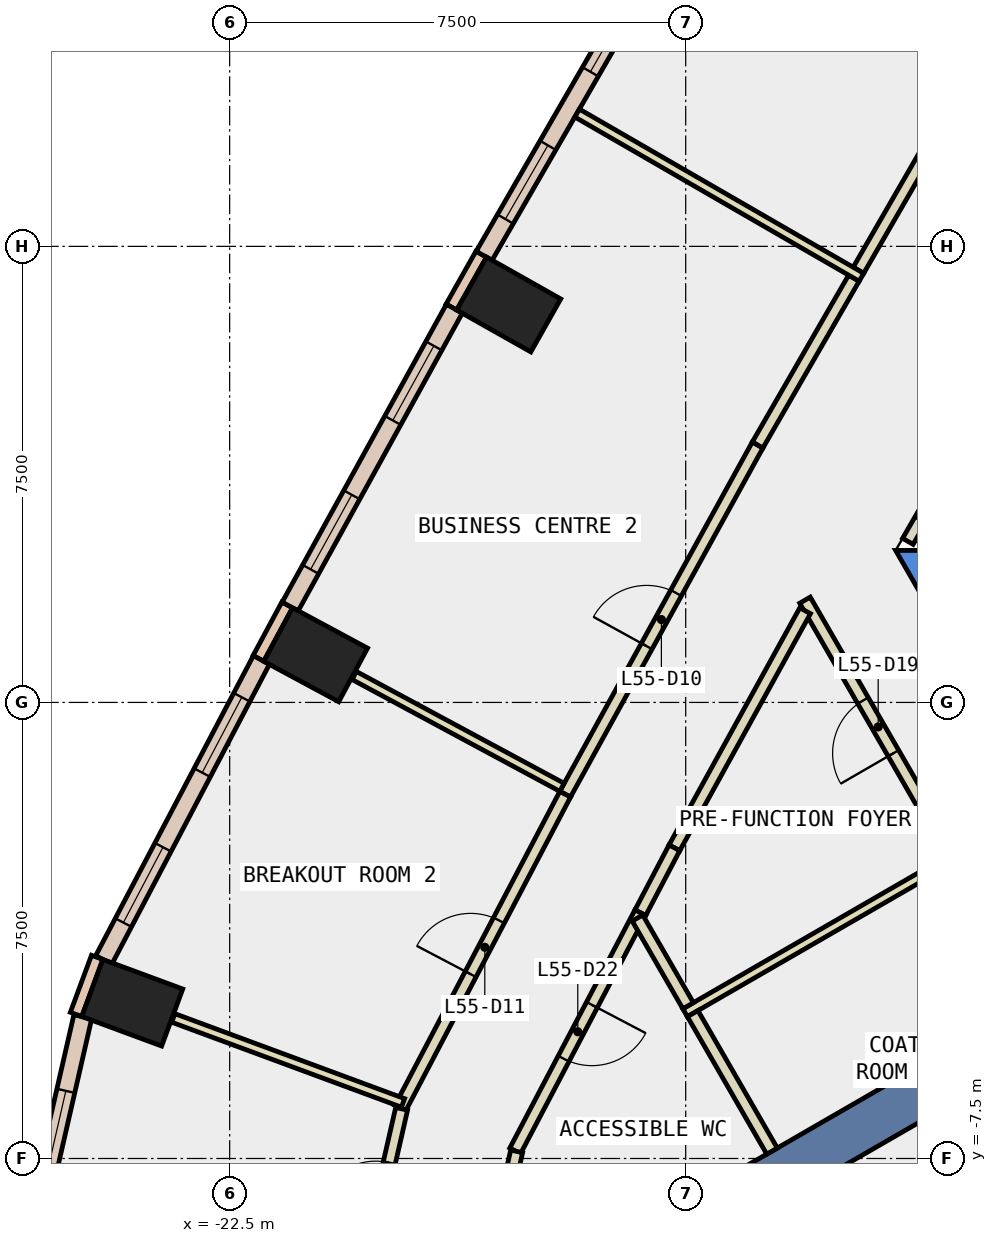
"""IFC4 building model, lengths in metres.
Left out: names, types, materials, properties, quantities, classifications, styles, units other than length and angle.
Written with IfcOpenShell. Run it as: python <this file> out.ifc"""

import sys

from ifc_helpers import new_model, si_unit, direction, frame, frame_2d, origin, origin_2d, place, context, subcontext, project, spatial, polyline, rectangle, outline, extrude, element, fill, save


model = new_model("IFC4")
c1 = context("Model", 3, precision=1e-05, world=origin(), true_north=direction((0.0, 1.0)))
c2 = subcontext(c1, "Body", "Model", "MODEL_VIEW")
j1 = project(units=[si_unit("LENGTHUNIT", "METRE"), si_unit("PLANEANGLEUNIT", "RADIAN")], contexts=[c1])
p1 = place(None, origin())
s1 = spatial("IfcSite", under=j1, at=p1, CompositionType="ELEMENT")
p2 = place(p1, origin())
s2 = spatial("IfcBuilding", under=s1, at=p2, CompositionType="ELEMENT")
p3 = place(p2, frame((0.0, 0.0, 245.0)))
s3 = spatial("IfcBuildingStorey", under=s2, at=p3, CompositionType="ELEMENT", Elevation=245.0)
for number, where, z_axis, x_axis in (
    (1, (-17.911, 6.544, -0.34), (0.0, 0.0, 1.0), (0.491, 0.871, 0.0)),
    (2, (-21.086, 0.784, -0.34), (0.0, 0.0, 1.0), (0.474, 0.881, 0.0)),
    (3, (-24.102, -4.939, -0.34), (0.0, 0.0, 1.0), (0.347, 0.938, 0.0)),
):
    element("IfcColumn", number, at=place(p3, frame(where, z_axis=z_axis, x_axis=x_axis)), inside=s3, PredefinedType="COLUMN", context=c2, shape_type="SweptSolid", body=[
        extrude(rectangle(XDim=1.0, YDim=1.4, at=origin_2d()), origin(), (0.0, 0.0, 1.0), 3.6),
    ])
p4 = place(p3, frame((0.0, 0.0, -0.34)))
e4 = element("IfcWall", 4, at=p4, inside=s3, PredefinedType="SHEAR", context=c2, shape_type="SweptSolid", body=[
    extrude(outline(polyline([(-11.547, 2.5), (-5.774, -7.5), (-5.427, -6.9), (-10.854, 2.5), (-11.547, 2.5)])), origin(), (0.0, 0.0, 1.0), 3.6),
])
p5 = place(p3, frame((-7.578, -4.375, -0.34), z_axis=(0.0, 0.0, 1.0), x_axis=(-0.866024315419, -0.5000018851, 0.0)))
e5 = element("IfcWall", 5, at=p5, inside=s3, PredefinedType="SHEAR", context=c2, shape_type="SweptSolid", body=[
    extrude(rectangle(XDim=9.0, YDim=0.8, at=frame_2d((4.5, 0.0))), origin(), (0.0, 0.0, 1.0), 3.6),
])
for number, where, z_axis, x_axis in (
    (6, (-18.362, 7.372, 0.0), (0.0, 0.0, 1.0), (-0.492, -0.871, 0.0)),
    (7, (-21.553, 1.604, 0.0), (0.0, 0.0, 1.0), (-0.474, -0.881, 0.0)),
):
    element("IfcWall", number, at=place(p3, frame(where, z_axis=z_axis, x_axis=x_axis)), inside=s3, PredefinedType="STANDARD", context=c2, shape_type="SweptSolid", body=[
        extrude(rectangle(XDim=1.0, YDim=0.2, at=frame_2d((0.5, 0.0))), origin(), (0.0, 0.0, 1.0), 3.26),
    ])
p6 = place(p3, frame((-24.679, -4.193, 0.0), z_axis=(0.0, 0.0, 1.0), x_axis=(-0.346892928577, -0.937904737222, 0.0)))
e8 = element("IfcWall", 8, at=p6, inside=s3, PredefinedType="STANDARD", context=c2, shape_type="SweptSolid", body=[
    extrude(rectangle(XDim=1.0, YDim=0.2, at=frame_2d((0.5, 0.0))), origin(), (0.0, 0.0, 1.0), 3.26),
])
p7 = place(p3, frame((-15.518, 12.189, 0.0), z_axis=(0.0, 0.0, 1.0), x_axis=(-0.49995037644, -0.866054052065, 0.0)))
e9 = element("IfcWall", 9, at=p7, inside=s3, PredefinedType="STANDARD", context=c2, shape_type="SweptSolid", body=[
    extrude(rectangle(XDim=5.594, YDim=0.3, at=frame_2d((2.797, 0.0))), origin(), (0.0, 0.0, 1.0), 3.26),
])
p8 = place(p7, frame((0.699, 0.0, 0.9)))
e10 = element("IfcOpeningElement", 10, at=p8, cuts=e9, PredefinedType="OPENING", context=c2, shape_type="SweptSolid", body=[
    extrude(rectangle(XDim=1.4, YDim=2.0, at=frame_2d((0.7, 1.0))), frame((0.0, 0.16, 0.0), z_axis=(0.0, -1.0, 0.0), x_axis=(1.0, 0.0, 0.0)), (0.0, 0.0, 1.0), 0.32),
])
p9 = place(p7, frame((3.496, 0.0, 0.9)))
e11 = element("IfcOpeningElement", 11, at=p9, cuts=e9, PredefinedType="OPENING", context=c2, shape_type="SweptSolid", body=[
    extrude(rectangle(XDim=1.4, YDim=2.0, at=frame_2d((0.7, 1.0))), frame((0.0, 0.16, 0.0), z_axis=(0.0, -1.0, 0.0), x_axis=(1.0, 0.0, 0.0)), (0.0, 0.0, 1.0), 0.32),
])
p10 = place(p3, frame((-18.805, 6.475, 0.0), z_axis=(0.0, 0.0, 1.0), x_axis=(-0.482734585173, -0.875766704253, 0.0)))
e12 = element("IfcWall", 12, at=p10, inside=s3, PredefinedType="STANDARD", context=c2, shape_type="SweptSolid", body=[
    extrude(rectangle(XDim=5.593, YDim=0.3, at=frame_2d((2.796, 0.0))), origin(), (0.0, 0.0, 1.0), 3.26),
])
p11 = place(p10, frame((0.698, 0.0, 0.9)))
e13 = element("IfcOpeningElement", 13, at=p11, cuts=e12, PredefinedType="OPENING", context=c2, shape_type="SweptSolid", body=[
    extrude(rectangle(XDim=1.4, YDim=2.0, at=frame_2d((0.7, 1.0))), frame((0.0, 0.16, 0.0), z_axis=(0.0, -1.0, 0.0), x_axis=(1.0, 0.0, 0.0)), (0.0, 0.0, 1.0), 0.32),
])
p12 = place(p10, frame((3.495, 0.0, 0.9)))
e14 = element("IfcOpeningElement", 14, at=p12, cuts=e12, PredefinedType="OPENING", context=c2, shape_type="SweptSolid", body=[
    extrude(rectangle(XDim=1.4, YDim=2.0, at=frame_2d((0.7, 1.0))), frame((0.0, 0.16, 0.0), z_axis=(0.0, -1.0, 0.0), x_axis=(1.0, 0.0, 0.0)), (0.0, 0.0, 1.0), 0.32),
])
p13 = place(p3, frame((-21.978, 0.698, 0.0), z_axis=(0.0, 0.0, 1.0), x_axis=(-0.465228032148, -0.885190871001, 0.0)))
e15 = element("IfcWall", 15, at=p13, inside=s3, PredefinedType="STANDARD", context=c2, shape_type="SweptSolid", body=[
    extrude(rectangle(XDim=5.572, YDim=0.3, at=frame_2d((2.786, 0.0))), origin(), (0.0, 0.0, 1.0), 3.26),
])
p14 = place(p13, frame((0.693, 0.0, 0.9)))
e16 = element("IfcOpeningElement", 16, at=p14, cuts=e15, PredefinedType="OPENING", context=c2, shape_type="SweptSolid", body=[
    extrude(rectangle(XDim=1.4, YDim=2.0, at=frame_2d((0.7, 1.0))), frame((0.0, 0.16, 0.0), z_axis=(0.0, -1.0, 0.0), x_axis=(1.0, 0.0, 0.0)), (0.0, 0.0, 1.0), 0.32),
])
p15 = place(p13, frame((3.479, 0.0, 0.9)))
e17 = element("IfcOpeningElement", 17, at=p15, cuts=e15, PredefinedType="OPENING", context=c2, shape_type="SweptSolid", body=[
    extrude(rectangle(XDim=1.4, YDim=2.0, at=frame_2d((0.7, 1.0))), frame((0.0, 0.16, 0.0), z_axis=(0.0, -1.0, 0.0), x_axis=(1.0, 0.0, 0.0)), (0.0, 0.0, 1.0), 0.32),
])
p16 = place(p3, frame((-24.916, -5.17, 0.0), z_axis=(0.0, 0.0, 1.0), x_axis=(-0.222901327396, -0.974841011778, 0.0)))
e18 = element("IfcWall", 18, at=p16, inside=s3, PredefinedType="STANDARD", context=c2, shape_type="SweptSolid", body=[
    extrude(rectangle(XDim=3.898, YDim=0.3, at=frame_2d((1.949, 0.0))), origin(), (0.0, 0.0, 1.0), 3.26),
])
p17 = place(p16, frame((1.249, 0.0, 0.9)))
e19 = element("IfcOpeningElement", 19, at=p17, cuts=e18, PredefinedType="OPENING", context=c2, shape_type="SweptSolid", body=[
    extrude(rectangle(XDim=1.4, YDim=2.0, at=frame_2d((0.7, 1.0))), frame((0.0, 0.16, 0.0), z_axis=(0.0, -1.0, 0.0), x_axis=(1.0, 0.0, 0.0)), (0.0, 0.0, 1.0), 0.32),
])
p18 = place(p3, frame((-10.63, -2.488, 0.0), z_axis=(0.0, 0.0, 1.0), x_axis=(-0.500108649621, 0.865962665808, 0.0)))
e20 = element("IfcWall", 20, at=p18, inside=s3, PredefinedType="PARTITIONING", context=c2, shape_type="SweptSolid", body=[
    extrude(rectangle(XDim=4.815, YDim=0.2, at=frame_2d((2.408, 0.0))), origin(), (0.0, 0.0, 1.0), 3.26),
])
p19 = place(p18, frame((1.908, 0.0, 0.0)))
e21 = element("IfcOpeningElement", 21, at=p19, cuts=e20, PredefinedType="OPENING", context=c2, shape_type="SweptSolid", body=[
    extrude(rectangle(XDim=1.0, YDim=2.1, at=frame_2d((0.5, 1.05))), frame((0.0, 0.11, 0.0), z_axis=(0.0, -1.0, 0.0), x_axis=(1.0, 0.0, 0.0)), (0.0, 0.0, 1.0), 0.22),
])
p20 = place(p3, frame((-13.036, 1.508, 0.0), z_axis=(0.0, 0.0, 1.0), x_axis=(-0.482884552822, -0.87568402329, 0.0)))
e22 = element("IfcWall", 22, at=p20, inside=s3, PredefinedType="PARTITIONING", context=c2, shape_type="SweptSolid", body=[
    extrude(rectangle(XDim=4.453, YDim=0.2, at=frame_2d((2.226, 0.0))), origin(), (0.0, 0.0, 1.0), 3.26),
])
p21 = place(p3, frame((-15.186, -2.391, 0.0), z_axis=(0.0, 0.0, 1.0), x_axis=(-0.464794189951, -0.885418748948, 0.0)))
e23 = element("IfcWall", 23, at=p21, inside=s3, PredefinedType="PARTITIONING", context=c2, shape_type="SweptSolid", body=[
    extrude(rectangle(XDim=1.205, YDim=0.2, at=frame_2d((0.603, 0.0))), origin(), (0.0, 0.0, 1.0), 3.26),
])
p22 = place(p3, frame((-15.746, -3.458, 0.0), z_axis=(0.0, 0.0, 1.0), x_axis=(-0.465179971699, -0.885216128372, 0.0)))
e24 = element("IfcWall", 24, at=p22, inside=s3, PredefinedType="PARTITIONING", context=c2, shape_type="SweptSolid", body=[
    extrude(rectangle(XDim=4.424, YDim=0.2, at=frame_2d((2.212, 0.0))), origin(), (0.0, 0.0, 1.0), 3.26),
])
p23 = place(p22, frame((1.712, 0.0, 0.0)))
e25 = element("IfcOpeningElement", 25, at=p23, cuts=e24, PredefinedType="OPENING", context=c2, shape_type="SweptSolid", body=[
    extrude(rectangle(XDim=1.0, YDim=2.1, at=frame_2d((0.5, 1.05))), frame((0.0, 0.11, 0.0), z_axis=(0.0, -1.0, 0.0), x_axis=(1.0, 0.0, 0.0)), (0.0, 0.0, 1.0), 0.22),
])
p24 = place(p3, frame((-17.78, -7.383, 0.0), z_axis=(0.0, 0.0, 1.0), x_axis=(-0.222760041204, -0.974873306662, 0.0)))
e26 = element("IfcWall", 26, at=p24, inside=s3, PredefinedType="PARTITIONING", context=c2, shape_type="SweptSolid", body=[
    extrude(rectangle(XDim=2.047, YDim=0.2, at=frame_2d((1.024, 0.0))), origin(), (0.0, 0.0, 1.0), 3.26),
])
p25 = place(p3, frame((-12.159, 7.107, 0.0), z_axis=(0.0, 0.0, 1.0), x_axis=(0.499953838557, 0.866052053466, 0.0)))
e27 = element("IfcWall", 27, at=p25, inside=s3, PredefinedType="PARTITIONING", context=c2, shape_type="SweptSolid", body=[
    extrude(rectangle(XDim=3.166, YDim=0.2, at=frame_2d((1.583, 0.0))), origin(), (0.0, 0.0, 1.0), 3.26),
])
p26 = place(p3, frame((-16.983, -1.509, 0.0), z_axis=(0.0, 0.0, 1.0), x_axis=(0.482785999899, 0.875738361785, 0.0)))
e28 = element("IfcWall", 28, at=p26, inside=s3, PredefinedType="PARTITIONING", context=c2, shape_type="SweptSolid", body=[
    extrude(rectangle(XDim=6.558, YDim=0.2, at=frame_2d((3.279, 0.0))), origin(), (0.0, 0.0, 1.0), 3.26),
])
p27 = place(p26, frame((2.779, 0.0, 0.0)))
e29 = element("IfcOpeningElement", 29, at=p27, cuts=e28, PredefinedType="OPENING", context=c2, shape_type="SweptSolid", body=[
    extrude(rectangle(XDim=1.0, YDim=2.1, at=frame_2d((0.5, 1.05))), frame((0.0, 0.11, 0.0), z_axis=(0.0, -1.0, 0.0), x_axis=(1.0, 0.0, 0.0)), (0.0, 0.0, 1.0), 0.22),
])
p28 = place(p3, frame((-13.817, 4.234, 0.0), z_axis=(0.0, 0.0, 1.0), x_axis=(0.499820325382, 0.866129114125, 0.0)))
e30 = element("IfcWall", 30, at=p28, inside=s3, PredefinedType="PARTITIONING", context=c2, shape_type="SweptSolid", body=[
    extrude(rectangle(XDim=3.167, YDim=0.2, at=frame_2d((1.583, 0.0))), origin(), (0.0, 0.0, 1.0), 3.26),
])
p29 = place(p3, frame((-19.696, -6.675, 0.0), z_axis=(0.0, 0.0, 1.0), x_axis=(0.465165163774, 0.88522390976, 0.0)))
e31 = element("IfcWall", 31, at=p29, inside=s3, PredefinedType="PARTITIONING", context=c2, shape_type="SweptSolid", body=[
    extrude(rectangle(XDim=5.835, YDim=0.2, at=frame_2d((2.917, 0.0))), origin(), (0.0, 0.0, 1.0), 3.26),
])
p30 = place(p29, frame((2.492, 0.0, 0.0)))
e32 = element("IfcOpeningElement", 32, at=p30, cuts=e31, PredefinedType="OPENING", context=c2, shape_type="SweptSolid", body=[
    extrude(rectangle(XDim=1.0, YDim=2.1, at=frame_2d((0.5, 1.05))), frame((0.0, 0.11, 0.0), z_axis=(0.0, -1.0, 0.0), x_axis=(1.0, 0.0, 0.0)), (0.0, 0.0, 1.0), 0.22),
])
p31 = place(p3, frame((-20.299, -9.43, 0.0), z_axis=(0.0, 0.0, 1.0), x_axis=(0.222523624687, 0.974927298036, 0.0)))
e33 = element("IfcWall", 33, at=p31, inside=s3, PredefinedType="PARTITIONING", context=c2, shape_type="SweptSolid", body=[
    extrude(rectangle(XDim=2.817, YDim=0.2, at=frame_2d((1.409, 0.0))), origin(), (0.0, 0.0, 1.0), 3.26),
])
p32 = place(p31, frame((0.909, 0.0, 0.0)))
e34 = element("IfcOpeningElement", 34, at=p32, cuts=e33, PredefinedType="OPENING", context=c2, shape_type="SweptSolid", body=[
    extrude(rectangle(XDim=1.0, YDim=2.1, at=frame_2d((0.5, 1.05))), frame((0.0, 0.11, 0.0), z_axis=(0.0, -1.0, 0.0), x_axis=(1.0, 0.0, 0.0)), (0.0, 0.0, 1.0), 0.22),
])
p33 = place(p3, frame((-10.506, -2.503, 0.0), z_axis=(0.0, 0.0, 1.0), x_axis=(-0.866044872465, -0.49996627774, 0.0)))
e35 = element("IfcWall", 35, at=p33, inside=s3, PredefinedType="PARTITIONING", context=c2, shape_type="SweptSolid", body=[
    extrude(rectangle(XDim=5.2, YDim=0.15, at=frame_2d((2.6, 0.0))), origin(), (0.0, 0.0, 1.0), 3.26),
])
p34 = place(p3, frame((-14.96, -4.988, 0.0), z_axis=(0.0, 0.0, 1.0), x_axis=(-0.500175017317, 0.865924333907, 0.0)))
e36 = element("IfcWall", 36, at=p34, inside=s3, PredefinedType="PARTITIONING", context=c2, shape_type="SweptSolid", body=[
    extrude(rectangle(XDim=1.666, YDim=0.2, at=frame_2d((0.833, 0.0))), origin(), (0.0, 0.0, 1.0), 3.26),
])
p35 = place(p3, frame((-8.111, -6.651, 0.0), z_axis=(0.0, 0.0, 1.0), x_axis=(-0.865984471925, -0.50007088936, 0.0)))
e37 = element("IfcWall", 37, at=p35, inside=s3, PredefinedType="PARTITIONING", context=c2, shape_type="SweptSolid", body=[
    extrude(rectangle(XDim=5.176, YDim=0.15, at=frame_2d((2.588, 0.0))), origin(), (0.0, 0.0, 1.0), 3.26),
])
p36 = place(p3, frame((-13.58, -7.379, 0.0), z_axis=(0.0, 0.0, 1.0), x_axis=(-0.499870876044, 0.866099940701, 0.0)))
e38 = element("IfcWall", 38, at=p36, inside=s3, PredefinedType="PARTITIONING", context=c2, shape_type="SweptSolid", body=[
    extrude(rectangle(XDim=2.611, YDim=0.2, at=frame_2d((1.305, 0.0))), origin(), (0.0, 0.0, 1.0), 3.26),
])
p37 = place(p3, frame((-12.11, 6.992, 0.0), z_axis=(0.0, 0.0, 1.0), x_axis=(-0.865994316829, 0.50005384032, 0.0)))
e39 = element("IfcWall", 39, at=p37, inside=s3, PredefinedType="PARTITIONING", context=c2, shape_type="SweptSolid", body=[
    extrude(rectangle(XDim=5.399, YDim=0.15, at=frame_2d((2.7, 0.0))), origin(), (0.0, 0.0, 1.0), 3.26),
])
p38 = place(p3, frame((-17.035, -1.396, 0.0), z_axis=(0.0, 0.0, 1.0), x_axis=(-0.88055795398, 0.473938487234, 0.0)))
e40 = element("IfcWall", 40, at=p38, inside=s3, PredefinedType="PARTITIONING", context=c2, shape_type="SweptSolid", body=[
    extrude(rectangle(XDim=3.88, YDim=0.15, at=frame_2d((1.94, 0.0))), origin(), (0.0, 0.0, 1.0), 3.26),
])
p39 = place(p3, frame((-19.649, -6.586, 0.0), z_axis=(0.0, 0.0, 1.0), x_axis=(-0.937935790958, 0.346808956114, 0.0)))
e41 = element("IfcWall", 41, at=p39, inside=s3, PredefinedType="PARTITIONING", context=c2, shape_type="SweptSolid", body=[
    extrude(rectangle(XDim=4.028, YDim=0.15, at=frame_2d((2.014, 0.0))), origin(), (0.0, 0.0, 1.0), 3.26),
])
p40 = place(p3, frame((-10.449, 4.203, 0.0), z_axis=(0.0, 0.0, 1.0), x_axis=(-0.499914839587, -0.866074565589, 0.0)))
e42 = element("IfcWall", 42, at=p40, inside=s3, PredefinedType="PARTITIONING", context=c2, shape_type="SweptSolid", body=[
    extrude(rectangle(XDim=1.794, YDim=0.2, at=frame_2d((0.897, 0.0))), origin(), (0.0, 0.0, 1.0), 2.4),
])
p41 = place(p40, frame((0.397, 0.0, 0.0)))
e43 = element("IfcOpeningElement", 43, at=p41, cuts=e42, PredefinedType="OPENING", context=c2, shape_type="SweptSolid", body=[
    extrude(rectangle(XDim=1.0, YDim=2.1, at=frame_2d((0.5, 1.05))), frame((0.0, 0.11, 0.0), z_axis=(0.0, -1.0, 0.0), x_axis=(1.0, 0.0, 0.0)), (0.0, 0.0, 1.0), 0.22),
])
p42 = place(p8, origin())
e44 = element("IfcWindow", 44, at=p42, inside=s3, PartitioningType="SINGLE_PANEL", PredefinedType="WINDOW", context=c2, shape_type="SweptSolid", body=[
    extrude(rectangle(XDim=1.4, YDim=2.0, at=frame_2d((0.7, 1.0))), frame((0.0, 0.03, 0.0), z_axis=(0.0, -1.0, 0.0), x_axis=(1.0, 0.0, 0.0)), (0.0, 0.0, 1.0), 0.06),
])
fill(e10, e44)
p43 = place(p9, origin())
e45 = element("IfcWindow", 45, at=p43, inside=s3, PartitioningType="SINGLE_PANEL", PredefinedType="WINDOW", context=c2, shape_type="SweptSolid", body=[
    extrude(rectangle(XDim=1.4, YDim=2.0, at=frame_2d((0.7, 1.0))), frame((0.0, 0.03, 0.0), z_axis=(0.0, -1.0, 0.0), x_axis=(1.0, 0.0, 0.0)), (0.0, 0.0, 1.0), 0.06),
])
fill(e11, e45)
p44 = place(p11, origin())
e46 = element("IfcWindow", 46, at=p44, inside=s3, PartitioningType="SINGLE_PANEL", PredefinedType="WINDOW", context=c2, shape_type="SweptSolid", body=[
    extrude(rectangle(XDim=1.4, YDim=2.0, at=frame_2d((0.7, 1.0))), frame((0.0, 0.03, 0.0), z_axis=(0.0, -1.0, 0.0), x_axis=(1.0, 0.0, 0.0)), (0.0, 0.0, 1.0), 0.06),
])
fill(e13, e46)
p45 = place(p12, origin())
e47 = element("IfcWindow", 47, at=p45, inside=s3, PartitioningType="SINGLE_PANEL", PredefinedType="WINDOW", context=c2, shape_type="SweptSolid", body=[
    extrude(rectangle(XDim=1.4, YDim=2.0, at=frame_2d((0.7, 1.0))), frame((0.0, 0.03, 0.0), z_axis=(0.0, -1.0, 0.0), x_axis=(1.0, 0.0, 0.0)), (0.0, 0.0, 1.0), 0.06),
])
fill(e14, e47)
p46 = place(p14, origin())
e48 = element("IfcWindow", 48, at=p46, inside=s3, PartitioningType="SINGLE_PANEL", PredefinedType="WINDOW", context=c2, shape_type="SweptSolid", body=[
    extrude(rectangle(XDim=1.4, YDim=2.0, at=frame_2d((0.7, 1.0))), frame((0.0, 0.03, 0.0), z_axis=(0.0, -1.0, 0.0), x_axis=(1.0, 0.0, 0.0)), (0.0, 0.0, 1.0), 0.06),
])
fill(e16, e48)
p47 = place(p15, origin())
e49 = element("IfcWindow", 49, at=p47, inside=s3, PartitioningType="SINGLE_PANEL", PredefinedType="WINDOW", context=c2, shape_type="SweptSolid", body=[
    extrude(rectangle(XDim=1.4, YDim=2.0, at=frame_2d((0.7, 1.0))), frame((0.0, 0.03, 0.0), z_axis=(0.0, -1.0, 0.0), x_axis=(1.0, 0.0, 0.0)), (0.0, 0.0, 1.0), 0.06),
])
fill(e17, e49)
p48 = place(p17, origin())
e50 = element("IfcWindow", 50, at=p48, inside=s3, PartitioningType="SINGLE_PANEL", PredefinedType="WINDOW", context=c2, shape_type="SweptSolid", body=[
    extrude(rectangle(XDim=1.4, YDim=2.0, at=frame_2d((0.7, 1.0))), frame((0.0, 0.03, 0.0), z_axis=(0.0, -1.0, 0.0), x_axis=(1.0, 0.0, 0.0)), (0.0, 0.0, 1.0), 0.06),
])
fill(e19, e50)
p49 = place(p27, origin())
e51 = element("IfcDoor", 51, at=p49, inside=s3, OperationType="SINGLE_SWING_LEFT", PredefinedType="DOOR", context=c2, shape_type="SweptSolid", body=[
    extrude(rectangle(XDim=1.0, YDim=2.1, at=frame_2d((0.5, 1.05))), frame((0.0, 0.025, 0.0), z_axis=(0.0, -1.0, 0.0), x_axis=(1.0, 0.0, 0.0)), (0.0, 0.0, 1.0), 0.05),
])
fill(e29, e51)
p50 = place(p30, origin())
e52 = element("IfcDoor", 52, at=p50, inside=s3, OperationType="SINGLE_SWING_LEFT", PredefinedType="DOOR", context=c2, shape_type="SweptSolid", body=[
    extrude(rectangle(XDim=1.0, YDim=2.1, at=frame_2d((0.5, 1.05))), frame((0.0, 0.025, 0.0), z_axis=(0.0, -1.0, 0.0), x_axis=(1.0, 0.0, 0.0)), (0.0, 0.0, 1.0), 0.05),
])
fill(e32, e52)
p51 = place(p32, origin())
e53 = element("IfcDoor", 53, at=p51, inside=s3, OperationType="SINGLE_SWING_LEFT", PredefinedType="DOOR", context=c2, shape_type="SweptSolid", body=[
    extrude(rectangle(XDim=1.0, YDim=2.1, at=frame_2d((0.5, 1.05))), frame((0.0, 0.025, 0.0), z_axis=(0.0, -1.0, 0.0), x_axis=(1.0, 0.0, 0.0)), (0.0, 0.0, 1.0), 0.05),
])
fill(e34, e53)
p52 = place(p19, origin())
e54 = element("IfcDoor", 54, at=p52, inside=s3, OperationType="SINGLE_SWING_LEFT", PredefinedType="DOOR", context=c2, shape_type="SweptSolid", body=[
    extrude(rectangle(XDim=1.0, YDim=2.1, at=frame_2d((0.5, 1.05))), frame((0.0, 0.025, 0.0), z_axis=(0.0, -1.0, 0.0), x_axis=(1.0, 0.0, 0.0)), (0.0, 0.0, 1.0), 0.05),
])
fill(e21, e54)
p53 = place(p23, origin())
e55 = element("IfcDoor", 55, at=p53, inside=s3, OperationType="SINGLE_SWING_LEFT", PredefinedType="DOOR", context=c2, shape_type="SweptSolid", body=[
    extrude(rectangle(XDim=1.0, YDim=2.1, at=frame_2d((0.5, 1.05))), frame((0.0, 0.025, 0.0), z_axis=(0.0, -1.0, 0.0), x_axis=(1.0, 0.0, 0.0)), (0.0, 0.0, 1.0), 0.05),
])
fill(e25, e55)
save(model, sys.argv[1])
